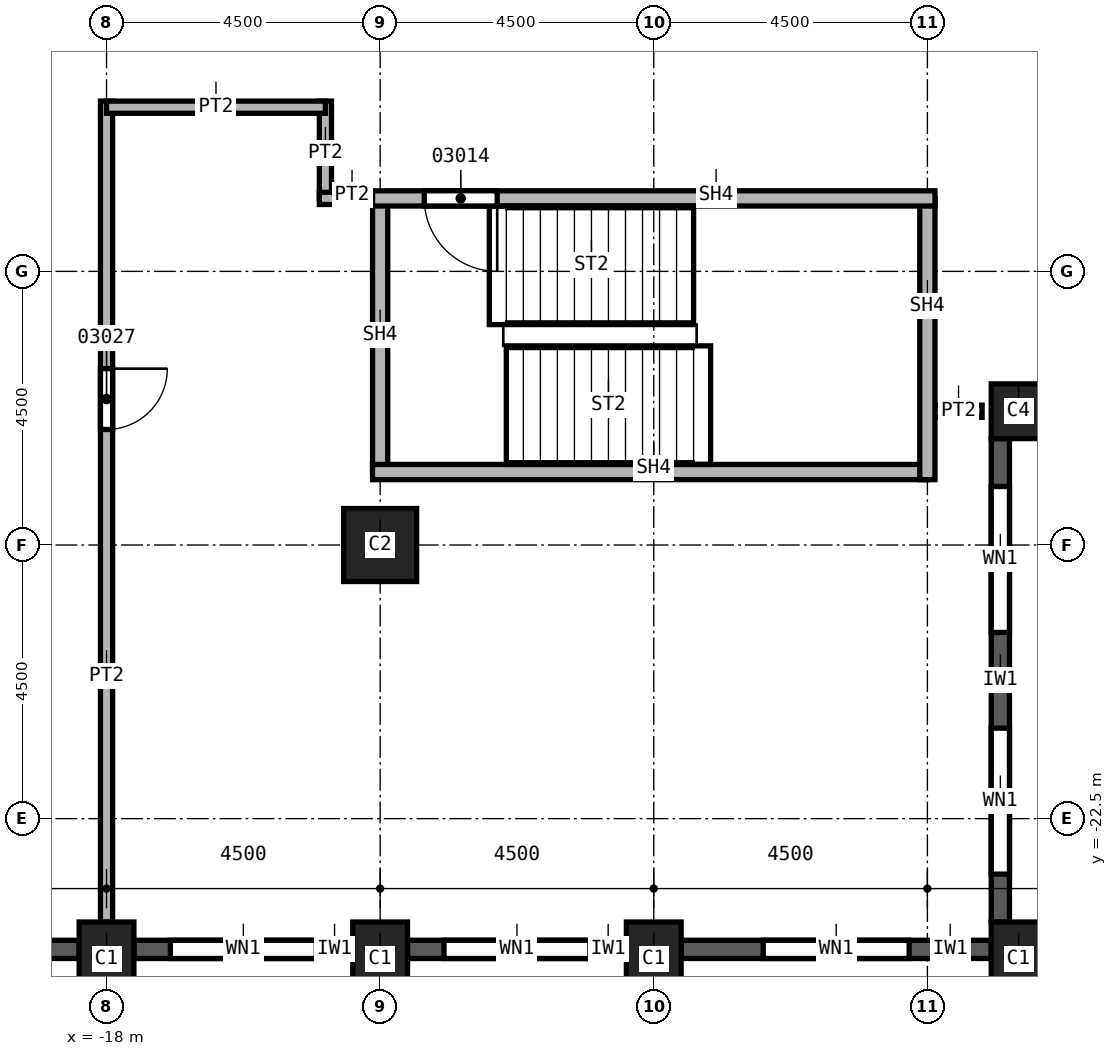
"""IFC4 building model, lengths in metres.
Left out: names, types, materials, properties, quantities, classifications, styles, units other than length and angle.
Written with IfcOpenShell. Run it as: python <this file> out.ifc"""

import sys

from ifc_helpers import new_model, si_unit, direction, frame, frame_2d, origin, origin_2d, place, context, subcontext, project, spatial, rectangle, extrude, element, fill, save


model = new_model("IFC4")
c1 = context("Model", 3, precision=1e-05, world=origin(), true_north=direction((0.0, 1.0)))
c2 = subcontext(c1, "Body", "Model", "MODEL_VIEW")
j1 = project(units=[si_unit("LENGTHUNIT", "METRE"), si_unit("PLANEANGLEUNIT", "RADIAN")], contexts=[c1])
p1 = place(None, origin())
s1 = spatial("IfcSite", under=j1, at=p1, CompositionType="ELEMENT")
p2 = place(p1, origin())
s2 = spatial("IfcBuilding", under=s1, at=p2, CompositionType="ELEMENT")
p3 = place(p2, frame((0.0, 0.0, 92.0)))
s3 = spatial("IfcBuildingStorey", under=s2, at=p3, CompositionType="ELEMENT", Elevation=92.0)
p4 = place(p3, frame((-13.5, -18.0, 0.0), z_axis=(0.0, 0.0, 1.0), x_axis=(1.0, 0.0, 0.0)))
e1 = element("IfcColumn", 1, at=p4, inside=s3, PredefinedType="COLUMN", context=c2, shape_type="SweptSolid", body=[
    extrude(rectangle(XDim=1.2, YDim=1.2, at=origin_2d()), origin(), (0.0, 0.0, 1.0), 3.7),
])
for number, where, z_axis, x_axis in (
    (2, (-3.0, -24.8, 0.0), (0.0, 0.0, 1.0), (1.0, 0.0, 0.0)),
    (3, (-9.0, -24.8, 0.0), (0.0, 0.0, 1.0), (1.0, 0.0, 0.0)),
    (4, (-13.5, -24.8, 0.0), (0.0, 0.0, 1.0), (1.0, 0.0, 0.0)),
    (5, (-18.0, -24.8, 0.0), (0.0, 0.0, 1.0), (1.0, 0.0, 0.0)),
):
    element("IfcColumn", number, at=place(p3, frame(where, z_axis=z_axis, x_axis=x_axis)), inside=s3, PredefinedType="COLUMN", context=c2, shape_type="SweptSolid", body=[
        extrude(rectangle(XDim=0.9, YDim=1.2, at=origin_2d()), origin(), (0.0, 0.0, 1.0), 3.7),
    ])
p5 = place(p3, frame((-3.0, -15.8, 0.0), z_axis=(0.0, 0.0, 1.0), x_axis=(1.0, 0.0, 0.0)))
e6 = element("IfcColumn", 6, at=p5, inside=s3, PredefinedType="COLUMN", context=c2, shape_type="SweptSolid", body=[
    extrude(rectangle(XDim=0.9, YDim=0.9, at=origin_2d()), origin(), (0.0, 0.0, 1.0), 3.7),
])
p6 = place(p3, frame((-22.05, -24.65, 0.0), z_axis=(0.0, 0.0, 1.0), x_axis=(1.0, 0.0, 0.0)))
e7 = element("IfcWall", 7, at=p6, inside=s3, PredefinedType="SOLIDWALL", context=c2, shape_type="SweptSolid", body=[
    extrude(rectangle(XDim=3.6, YDim=0.3, at=frame_2d((1.8, 0.0))), origin(), (0.0, 0.0, 1.0), 3.1),
])
p7 = place(p6, frame((0.775, 0.0, 0.8)))
e8 = element("IfcOpeningElement", 8, at=p7, cuts=e7, PredefinedType="OPENING", context=c2, shape_type="SweptSolid", body=[
    extrude(rectangle(XDim=1.0, YDim=1.95, at=frame_2d((0.5, 0.975))), frame((0.0, 0.15, 0.0), z_axis=(0.0, -1.0, 0.0), x_axis=(1.0, 0.0, 0.0)), (0.0, 0.0, 1.0), 0.3),
])
p8 = place(p6, frame((2.375, 0.0, 0.8)))
e9 = element("IfcOpeningElement", 9, at=p8, cuts=e7, PredefinedType="OPENING", context=c2, shape_type="SweptSolid", body=[
    extrude(rectangle(XDim=0.6, YDim=1.95, at=frame_2d((0.3, 0.975))), frame((0.0, 0.15, 0.0), z_axis=(0.0, -1.0, 0.0), x_axis=(1.0, 0.0, 0.0)), (0.0, 0.0, 1.0), 0.3),
])
p9 = place(p3, frame((-17.55, -24.65, 0.0), z_axis=(0.0, 0.0, 1.0), x_axis=(1.0, 0.0, 0.0)))
e10 = element("IfcWall", 10, at=p9, inside=s3, PredefinedType="SOLIDWALL", context=c2, shape_type="SweptSolid", body=[
    extrude(rectangle(XDim=3.6, YDim=0.3, at=frame_2d((1.8, 0.0))), origin(), (0.0, 0.0, 1.0), 3.1),
])
p10 = place(p9, frame((0.6, 0.0, 0.8)))
e11 = element("IfcOpeningElement", 11, at=p10, cuts=e10, PredefinedType="OPENING", context=c2, shape_type="SweptSolid", body=[
    extrude(rectangle(XDim=2.4, YDim=1.95, at=frame_2d((1.2, 0.975))), frame((0.0, 0.15, 0.0), z_axis=(0.0, -1.0, 0.0), x_axis=(1.0, 0.0, 0.0)), (0.0, 0.0, 1.0), 0.3),
])
p11 = place(p3, frame((-13.05, -24.65, 0.0), z_axis=(0.0, 0.0, 1.0), x_axis=(1.0, 0.0, 0.0)))
e12 = element("IfcWall", 12, at=p11, inside=s3, PredefinedType="SOLIDWALL", context=c2, shape_type="SweptSolid", body=[
    extrude(rectangle(XDim=3.6, YDim=0.3, at=frame_2d((1.8, 0.0))), origin(), (0.0, 0.0, 1.0), 3.1),
])
p12 = place(p11, frame((0.6, 0.0, 0.8)))
e13 = element("IfcOpeningElement", 13, at=p12, cuts=e12, PredefinedType="OPENING", context=c2, shape_type="SweptSolid", body=[
    extrude(rectangle(XDim=2.4, YDim=1.95, at=frame_2d((1.2, 0.975))), frame((0.0, 0.15, 0.0), z_axis=(0.0, -1.0, 0.0), x_axis=(1.0, 0.0, 0.0)), (0.0, 0.0, 1.0), 0.3),
])
p13 = place(p3, frame((-8.55, -24.65, 0.0), z_axis=(0.0, 0.0, 1.0), x_axis=(1.0, 0.0, 0.0)))
e14 = element("IfcWall", 14, at=p13, inside=s3, PredefinedType="SOLIDWALL", context=c2, shape_type="SweptSolid", body=[
    extrude(rectangle(XDim=5.1, YDim=0.3, at=frame_2d((2.55, 0.0))), origin(), (0.0, 0.0, 1.0), 3.1),
])
p14 = place(p13, frame((1.35, 0.0, 0.8)))
e15 = element("IfcOpeningElement", 15, at=p14, cuts=e14, PredefinedType="OPENING", context=c2, shape_type="SweptSolid", body=[
    extrude(rectangle(XDim=2.4, YDim=1.95, at=frame_2d((1.2, 0.975))), frame((0.0, 0.15, 0.0), z_axis=(0.0, -1.0, 0.0), x_axis=(1.0, 0.0, 0.0)), (0.0, 0.0, 1.0), 0.3),
])
p15 = place(p3, frame((-3.3, -24.2, 0.0), z_axis=(0.0, 0.0, 1.0), x_axis=(0.0, 1.0, 0.0)))
e16 = element("IfcWall", 16, at=p15, inside=s3, PredefinedType="SOLIDWALL", context=c2, shape_type="SweptSolid", body=[
    extrude(rectangle(XDim=7.95, YDim=0.3, at=frame_2d((3.975, 0.0))), origin(), (0.0, 0.0, 1.0), 3.1),
])
p16 = place(p15, frame((0.788, 0.0, 0.8)))
e17 = element("IfcOpeningElement", 17, at=p16, cuts=e16, PredefinedType="OPENING", context=c2, shape_type="SweptSolid", body=[
    extrude(rectangle(XDim=2.4, YDim=1.95, at=frame_2d((1.2, 0.975))), frame((0.0, 0.15, 0.0), z_axis=(0.0, -1.0, 0.0), x_axis=(1.0, 0.0, 0.0)), (0.0, 0.0, 1.0), 0.3),
])
p17 = place(p15, frame((4.762, 0.0, 0.8)))
e18 = element("IfcOpeningElement", 18, at=p17, cuts=e16, PredefinedType="OPENING", context=c2, shape_type="SweptSolid", body=[
    extrude(rectangle(XDim=2.4, YDim=1.95, at=frame_2d((1.2, 0.975))), frame((0.0, 0.15, 0.0), z_axis=(0.0, -1.0, 0.0), x_axis=(1.0, 0.0, 0.0)), (0.0, 0.0, 1.0), 0.3),
])
p18 = place(p3, frame((-18.0, -10.7, 0.0), z_axis=(0.0, 0.0, 1.0), x_axis=(0.0, -1.0, 0.0)))
e19 = element("IfcWall", 19, at=p18, inside=s3, PredefinedType="PARTITIONING", context=c2, shape_type="SweptSolid", body=[
    extrude(rectangle(XDim=13.5, YDim=0.2, at=frame_2d((6.75, 0.0))), origin(), (0.0, 0.0, 1.0), 3.7),
])
p19 = place(p18, frame((4.4, 0.0, 0.0)))
e20 = element("IfcOpeningElement", 20, at=p19, cuts=e19, PredefinedType="OPENING", context=c2, shape_type="SweptSolid", body=[
    extrude(rectangle(XDim=1.0, YDim=2.1, at=frame_2d((0.5, 1.05))), frame((0.0, 0.1, 0.0), z_axis=(0.0, -1.0, 0.0), x_axis=(1.0, 0.0, 0.0)), (0.0, 0.0, 1.0), 0.2),
])
p20 = place(p3, frame((-14.4, -12.3, 0.0), z_axis=(0.0, 0.0, 1.0), x_axis=(0.0, 1.0, 0.0)))
e21 = element("IfcWall", 21, at=p20, inside=s3, PredefinedType="PARTITIONING", context=c2, shape_type="SweptSolid", body=[
    extrude(rectangle(XDim=1.6, YDim=0.2, at=frame_2d((0.8, 0.0))), origin(), (0.0, 0.0, 1.0), 3.7),
])
p21 = place(p3, frame((-14.4, -10.8, 0.0), z_axis=(0.0, 0.0, 1.0), x_axis=(-1.0, 0.0, 0.0)))
e22 = element("IfcWall", 22, at=p21, inside=s3, PredefinedType="PARTITIONING", context=c2, shape_type="SweptSolid", body=[
    extrude(rectangle(XDim=3.6, YDim=0.2, at=frame_2d((1.8, 0.0))), origin(), (0.0, 0.0, 1.0), 3.7),
])
p22 = place(p3, frame((-13.375, -12.3, 0.0), z_axis=(0.0, 0.0, 1.0), x_axis=(-1.0, 0.0, 0.0)))
e23 = element("IfcWall", 23, at=p22, inside=s3, PredefinedType="PARTITIONING", context=c2, shape_type="SweptSolid", body=[
    extrude(rectangle(XDim=1.125, YDim=0.2, at=frame_2d((0.562, 0.0))), origin(), (0.0, 0.0, 1.0), 3.7),
])
p23 = place(p3, frame((-3.6, -15.8, 0.0), z_axis=(0.0, 0.0, 1.0), x_axis=(-1.0, 0.0, 0.0)))
e24 = element("IfcWall", 24, at=p23, inside=s3, PredefinedType="PARTITIONING", context=c2, shape_type="SweptSolid", body=[
    extrude(rectangle(XDim=0.9, YDim=0.2, at=frame_2d((0.45, 0.0))), origin(), (0.0, 0.0, 1.0), 3.7),
])
p24 = place(p3, frame((-13.5, -16.8, 0.0), z_axis=(0.0, 0.0, 1.0), x_axis=(0.0, 1.0, 0.0)))
e25 = element("IfcWall", 25, at=p24, inside=s3, PredefinedType="SOLIDWALL", context=c2, shape_type="SweptSolid", body=[
    extrude(rectangle(XDim=4.5, YDim=0.25, at=frame_2d((2.25, 0.0))), origin(), (0.0, 0.0, 1.0), 3.7),
])
p25 = place(p3, frame((-4.5, -16.8, 0.0), z_axis=(0.0, 0.0, 1.0), x_axis=(-1.0, 0.0, 0.0)))
e26 = element("IfcWall", 26, at=p25, inside=s3, PredefinedType="SOLIDWALL", context=c2, shape_type="SweptSolid", body=[
    extrude(rectangle(XDim=9.125, YDim=0.25, at=frame_2d((4.562, 0.0))), origin(), (0.0, 0.0, 1.0), 3.7),
])
p26 = place(p3, frame((-4.5, -12.3, 0.0), z_axis=(0.0, 0.0, 1.0), x_axis=(0.0, -1.0, 0.0)))
e27 = element("IfcWall", 27, at=p26, inside=s3, PredefinedType="SOLIDWALL", context=c2, shape_type="SweptSolid", body=[
    extrude(rectangle(XDim=4.625, YDim=0.25, at=frame_2d((2.312, 0.0))), origin(), (0.0, 0.0, 1.0), 3.7),
])
p27 = place(p3, frame((-4.375, -12.3, 0.0), z_axis=(0.0, 0.0, 1.0), x_axis=(-1.0, 0.0, 0.0)))
e28 = element("IfcWall", 28, at=p27, inside=s3, PredefinedType="SOLIDWALL", context=c2, shape_type="SweptSolid", body=[
    extrude(rectangle(XDim=9.25, YDim=0.25, at=frame_2d((4.625, 0.0))), origin(), (0.0, 0.0, 1.0), 3.7),
])
p28 = place(p27, frame((7.2, 0.0, 0.0)))
e29 = element("IfcOpeningElement", 29, at=p28, cuts=e28, PredefinedType="OPENING", context=c2, shape_type="SweptSolid", body=[
    extrude(rectangle(XDim=1.2, YDim=2.1, at=frame_2d((0.6, 1.05))), frame((0.0, 0.125, 0.0), z_axis=(0.0, -1.0, 0.0), x_axis=(1.0, 0.0, 0.0)), (0.0, 0.0, 1.0), 0.25),
])
p29 = place(p10, origin())
e30 = element("IfcWindow", 30, at=p29, inside=s3, PartitioningType="SINGLE_PANEL", PredefinedType="WINDOW", context=c2, shape_type="SweptSolid", body=[
    extrude(rectangle(XDim=2.4, YDim=1.95, at=frame_2d((1.2, 0.975))), frame((0.0, 0.03, 0.0), z_axis=(0.0, -1.0, 0.0), x_axis=(1.0, 0.0, 0.0)), (0.0, 0.0, 1.0), 0.06),
])
fill(e11, e30)
p30 = place(p12, origin())
e31 = element("IfcWindow", 31, at=p30, inside=s3, PartitioningType="SINGLE_PANEL", PredefinedType="WINDOW", context=c2, shape_type="SweptSolid", body=[
    extrude(rectangle(XDim=2.4, YDim=1.95, at=frame_2d((1.2, 0.975))), frame((0.0, 0.03, 0.0), z_axis=(0.0, -1.0, 0.0), x_axis=(1.0, 0.0, 0.0)), (0.0, 0.0, 1.0), 0.06),
])
fill(e13, e31)
p31 = place(p14, origin())
e32 = element("IfcWindow", 32, at=p31, inside=s3, PartitioningType="SINGLE_PANEL", PredefinedType="WINDOW", context=c2, shape_type="SweptSolid", body=[
    extrude(rectangle(XDim=2.4, YDim=1.95, at=frame_2d((1.2, 0.975))), frame((0.0, 0.03, 0.0), z_axis=(0.0, -1.0, 0.0), x_axis=(1.0, 0.0, 0.0)), (0.0, 0.0, 1.0), 0.06),
])
fill(e15, e32)
p32 = place(p16, origin())
e33 = element("IfcWindow", 33, at=p32, inside=s3, PartitioningType="SINGLE_PANEL", PredefinedType="WINDOW", context=c2, shape_type="SweptSolid", body=[
    extrude(rectangle(XDim=2.4, YDim=1.95, at=frame_2d((1.2, 0.975))), frame((0.0, 0.03, 0.0), z_axis=(0.0, -1.0, 0.0), x_axis=(1.0, 0.0, 0.0)), (0.0, 0.0, 1.0), 0.06),
])
fill(e17, e33)
p33 = place(p17, origin())
e34 = element("IfcWindow", 34, at=p33, inside=s3, PartitioningType="SINGLE_PANEL", PredefinedType="WINDOW", context=c2, shape_type="SweptSolid", body=[
    extrude(rectangle(XDim=2.4, YDim=1.95, at=frame_2d((1.2, 0.975))), frame((0.0, 0.03, 0.0), z_axis=(0.0, -1.0, 0.0), x_axis=(1.0, 0.0, 0.0)), (0.0, 0.0, 1.0), 0.06),
])
fill(e18, e34)
p34 = place(p28, origin())
e35 = element("IfcDoor", 35, at=p34, inside=s3, OperationType="SINGLE_SWING_LEFT", PredefinedType="DOOR", context=c2, shape_type="SweptSolid", body=[
    extrude(rectangle(XDim=1.2, YDim=2.1, at=frame_2d((0.6, 1.05))), frame((0.0, 0.025, 0.0), z_axis=(0.0, -1.0, 0.0), x_axis=(1.0, 0.0, 0.0)), (0.0, 0.0, 1.0), 0.05),
])
fill(e29, e35)
p35 = place(p19, origin())
e36 = element("IfcDoor", 36, at=p35, inside=s3, OperationType="SINGLE_SWING_RIGHT", PredefinedType="DOOR", context=c2, shape_type="SweptSolid", body=[
    extrude(rectangle(XDim=1.0, YDim=2.1, at=frame_2d((0.5, 1.05))), frame((0.0, 0.025, 0.0), z_axis=(0.0, -1.0, 0.0), x_axis=(1.0, 0.0, 0.0)), (0.0, 0.0, 1.0), 0.05),
])
fill(e20, e36)
save(model, sys.argv[1])
